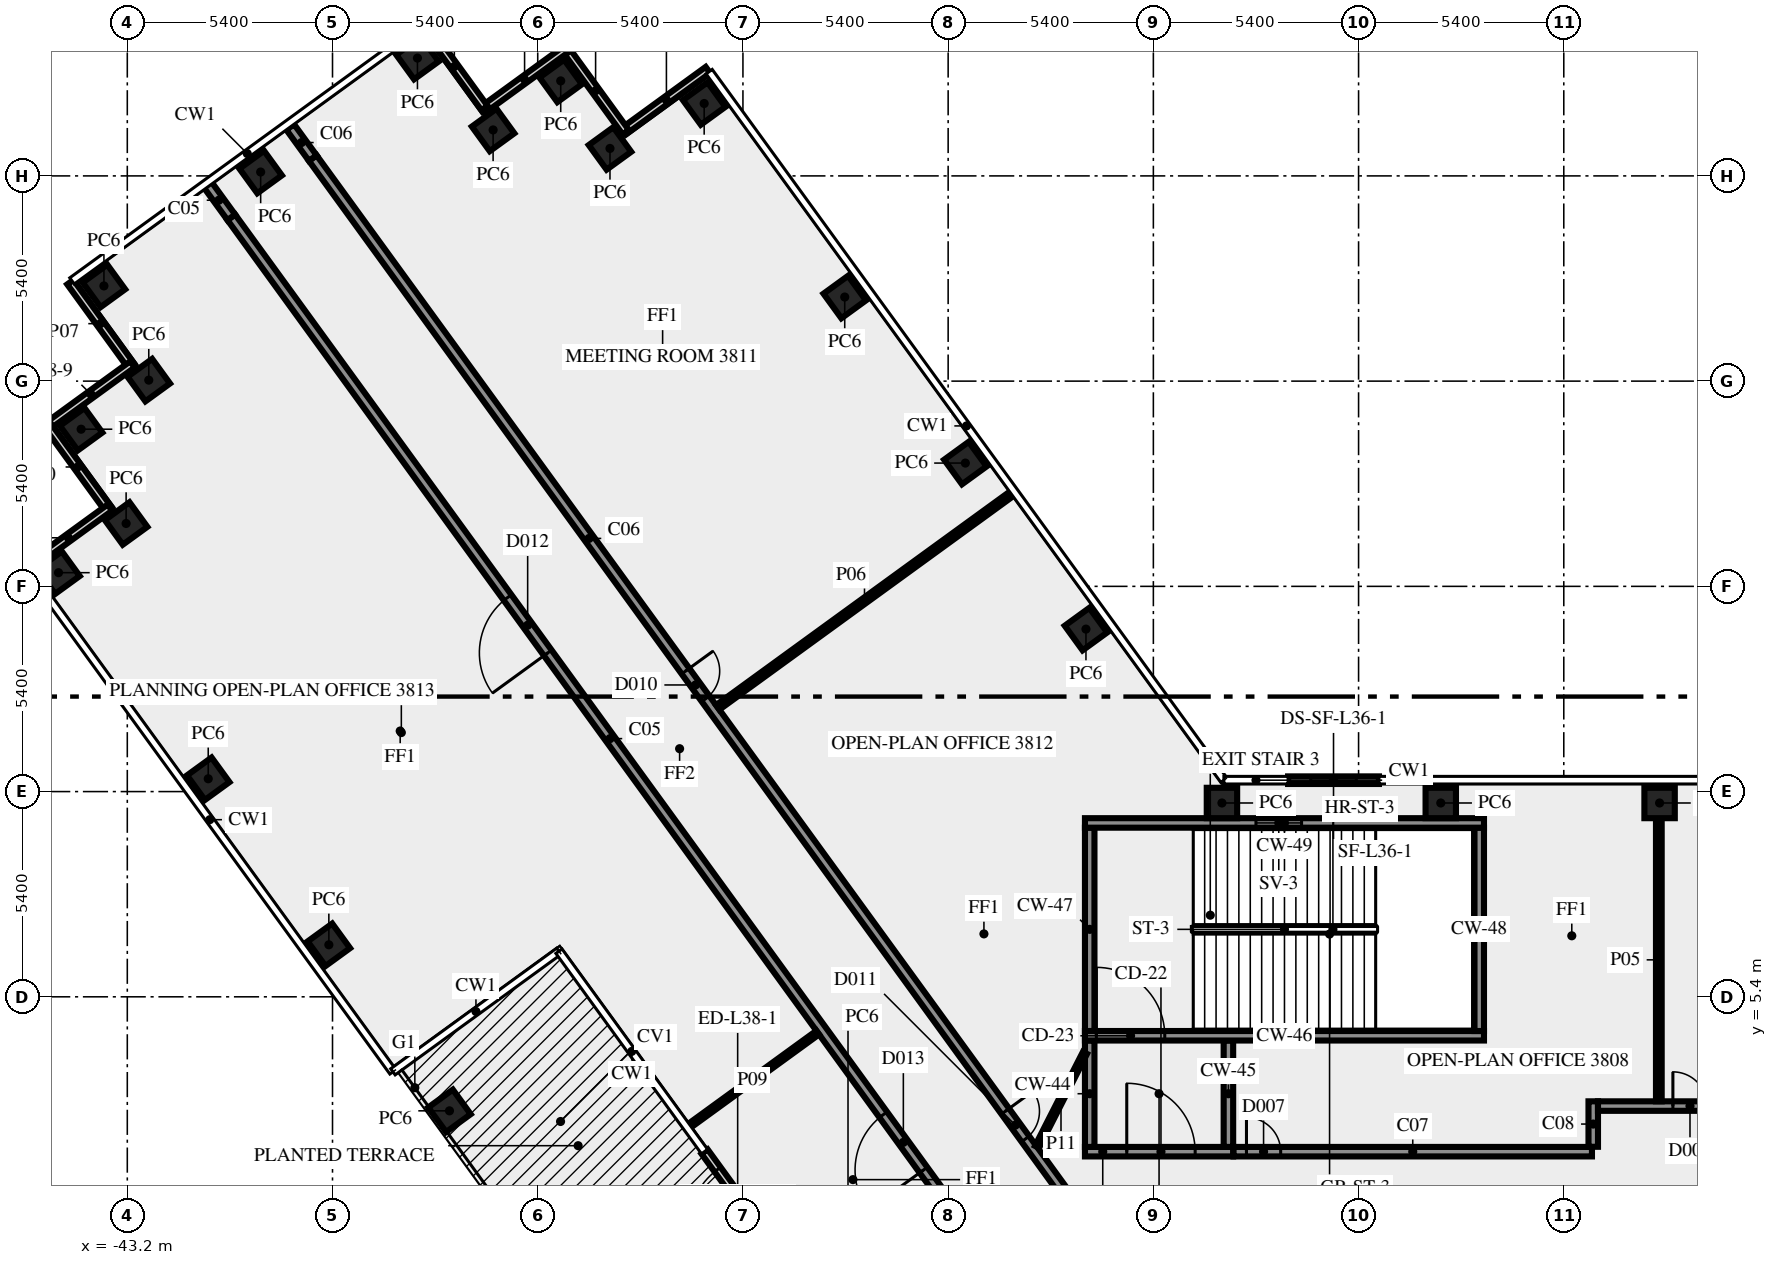
"""IFC4 building model, lengths in metres.
Left out: names, types, materials, properties, quantities, classifications, styles, units other than length and angle.
Written with IfcOpenShell. Run it as: python <this file> out.ifc"""

import sys

from ifc_helpers import new_model, si_unit, direction, frame, frame_2d, origin, origin_2d, place, context, subcontext, project, spatial, rectangle, extrude, element, fill, save


model = new_model("IFC4")
c1 = context("Model", 3, precision=1e-05, world=origin(), true_north=direction((0.0, 1.0)))
c2 = subcontext(c1, "Body", "Model", "MODEL_VIEW")
j1 = project(units=[si_unit("LENGTHUNIT", "METRE"), si_unit("PLANEANGLEUNIT", "RADIAN")], contexts=[c1])
p1 = place(None, origin())
s1 = spatial("IfcSite", under=j1, at=p1, CompositionType="ELEMENT")
p2 = place(p1, origin())
s2 = spatial("IfcBuilding", under=s1, at=p2, CompositionType="ELEMENT")
p3 = place(p2, frame((0.0, 0.0, 164.0)))
s3 = spatial("IfcBuildingStorey", under=s2, at=p3, CompositionType="ELEMENT", Elevation=164.0)
for number, where, z_axis, x_axis in (
    (1, (-17.974, 15.075, 0.0), (0.0, 0.0, 1.0), (-0.588, 0.809, 0.0)),
    (2, (-21.147, 19.444, 0.0), (0.0, 0.0, 1.0), (-0.588, 0.809, 0.0)),
    (3, (-24.321, 23.812, 0.0), (0.0, 0.0, 1.0), (-0.588, 0.809, 0.0)),
    (4, (-28.02, 28.905, 0.0), (0.0, 0.0, 1.0), (-0.809, -0.588, 0.0)),
    (5, (-30.499, 27.723, 0.0), (0.0, 0.0, 1.0), (-0.809, -0.588, 0.0)),
    (6, (-31.795, 29.5, 0.0), (0.0, 0.0, 1.0), (-0.588, 0.809, 0.0)),
    (7, (-33.574, 28.209, 0.0), (0.0, 0.0, 1.0), (-0.588, 0.809, 0.0)),
    (8, (-35.565, 30.1, 0.0), (0.0, 0.0, 1.0), (-0.809, -0.588, 0.0)),
    (9, (-39.691, 27.102, 0.0), (0.0, 0.0, 1.0), (-0.809, -0.588, 0.0)),
    (10, (-43.815, 24.105, 0.0), (0.0, 0.0, 1.0), (-0.809, -0.588, 0.0)),
    (11, (-42.635, 21.626, 0.0), (0.0, 0.0, 1.0), (-0.809, -0.588, 0.0)),
    (12, (-44.415, 20.335, 0.0), (0.0, 0.0, 1.0), (0.588, -0.809, 0.0)),
    (13, (-43.231, 17.854, 0.0), (0.0, 0.0, 1.0), (0.588, -0.809, 0.0)),
    (14, (-45.01, 16.56, 0.0), (0.0, 0.0, 1.0), (0.588, -0.809, 0.0)),
    (15, (-41.07, 11.137, 0.0), (0.0, 0.0, 1.0), (0.588, -0.809, 0.0)),
    (16, (-37.896, 6.769, 0.0), (0.0, 0.0, 1.0), (0.588, -0.809, 0.0)),
    (17, (-34.722, 2.4, 0.0), (0.0, 0.0, 1.0), (0.588, -0.809, 0.0)),
    (18, (-2.879, 10.5, 0.0), (0.0, 0.0, 1.0), (-1.0, 0.0, 0.0)),
    (19, (-8.637, 10.5, 0.0), (0.0, 0.0, 1.0), (-1.0, 0.0, 0.0)),
    (20, (-14.395, 10.5, 0.0), (0.0, 0.0, 1.0), (-1.0, 0.0, 0.0)),
):
    element("IfcColumn", number, at=place(p3, frame(where, z_axis=z_axis, x_axis=x_axis)), inside=s3, PredefinedType="COLUMN", context=c2, shape_type="SweptSolid", body=[
        extrude(rectangle(XDim=0.8, YDim=0.8, at=origin_2d()), origin(), (0.0, 0.0, 1.0), 3.65),
    ])
for number, where, z_axis, x_axis in (
    (21, (-27.921, 29.787, 0.0), (0.0, 0.0, 1.0), (-0.809, -0.588, 0.0)),
    (22, (-30.083, 28.149, 0.0), (0.0, 0.0, 1.0), (-0.588, 0.809, 0.0)),
    (23, (-31.654, 30.331, 0.0), (0.0, 0.0, 1.0), (-0.809, -0.588, 0.0)),
    (24, (-33.801, 28.786, 0.0), (0.0, 0.0, 1.0), (-0.588, 0.809, 0.0)),
    (25, (-44.699, 24.205, 0.0), (0.0, 0.0, 1.0), (0.588, -0.809, 0.0)),
):
    element("IfcWall", number, at=place(p3, frame(where, z_axis=z_axis, x_axis=x_axis)), inside=s3, PredefinedType="SOLIDWALL", context=c2, shape_type="SweptSolid", body=[
        extrude(rectangle(XDim=2.7, YDim=0.2, at=frame_2d((1.35, 0.0))), origin(), (0.0, 0.0, 1.0), 3.65),
    ])
p4 = place(p3, frame((-10.263, 11.1, 0.0), z_axis=(0.0, 0.0, 1.0), x_axis=(-1.0, 0.0, 0.0)))
e26 = element("IfcWall", 26, at=p4, inside=s3, PredefinedType="SOLIDWALL", context=c2, shape_type="SweptSolid", body=[
    extrude(rectangle(XDim=2.392, YDim=0.2, at=frame_2d((1.196, 0.0))), origin(), (0.0, 0.0, 1.0), 3.65),
])
p5 = place(p4, frame((0.596, 0.0, 1.0)))
e27 = element("IfcOpeningElement", 27, at=p5, cuts=e26, PredefinedType="OPENING", context=c2, shape_type="SweptSolid", body=[
    extrude(rectangle(XDim=1.2, YDim=1.2, at=frame_2d((0.6, 0.6))), frame((0.0, 0.11, 0.0), z_axis=(0.0, -1.0, 0.0), x_axis=(1.0, 0.0, 0.0)), (0.0, 0.0, 1.0), 0.22),
])
p6 = place(p3, frame((-26.268, -1.07, 0.0), z_axis=(0.0, 0.0, 1.0), x_axis=(-0.587735577821, 0.809053082661, 0.0)))
e28 = element("IfcWall", 28, at=p6, inside=s3, PredefinedType="SOLIDWALL", context=c2, shape_type="SweptSolid", body=[
    extrude(rectangle(XDim=2.963, YDim=0.2, at=frame_2d((1.481, 0.0))), origin(), (0.0, 0.0, 1.0), 3.65),
])
p7 = place(p6, frame((0.582, 0.0, 0.0)))
e29 = element("IfcOpeningElement", 29, at=p7, cuts=e28, PredefinedType="OPENING", context=c2, shape_type="SweptSolid", body=[
    extrude(rectangle(XDim=1.8, YDim=2.4, at=frame_2d((0.9, 1.2))), frame((0.0, 0.11, 0.0), z_axis=(0.0, -1.0, 0.0), x_axis=(1.0, 0.0, 0.0)), (0.0, 0.0, 1.0), 0.22),
])
for number, where, z_axis, x_axis in (
    (30, (-43.061, 22.043, 0.0), (0.0, 0.0, 1.0), (-0.809, -0.588, 0.0)),
    (31, (-45.296, 20.434, 0.0), (0.0, 0.0, 1.0), (0.588, -0.809, 0.0)),
    (32, (-43.658, 18.272, 0.0), (0.0, 0.0, 1.0), (-0.809, -0.588, 0.0)),
):
    element("IfcWall", number, at=place(p3, frame(where, z_axis=z_axis, x_axis=x_axis)), inside=s3, PredefinedType="SOLIDWALL", context=c2, shape_type="SweptSolid", body=[
        extrude(rectangle(XDim=2.7, YDim=0.2, at=frame_2d((1.35, 0.0))), origin(), (0.0, 0.0, 1.0), 3.65),
    ])
p8 = place(p3, frame((-18.0, 1.325, 0.0), z_axis=(0.0, 0.0, 1.0), x_axis=(1.0, 0.0, 0.0)))
e33 = element("IfcWall", 33, at=p8, inside=s3, PredefinedType="SHEAR", context=c2, shape_type="SweptSolid", body=[
    extrude(rectangle(XDim=3.9, YDim=0.25, at=frame_2d((1.95, 0.0))), origin(), (0.0, 0.0, 1.0), 3.65),
])
p9 = place(p8, frame((1.1, 0.0, 0.0)))
e34 = element("IfcOpeningElement", 34, at=p9, cuts=e33, PredefinedType="OPENING", context=c2, shape_type="SweptSolid", body=[
    extrude(rectangle(XDim=1.8, YDim=2.1, at=frame_2d((0.9, 1.05))), frame((0.0, 0.135, 0.0), z_axis=(0.0, -1.0, 0.0), x_axis=(1.0, 0.0, 0.0)), (0.0, 0.0, 1.0), 0.27),
])
for number, where, z_axis, x_axis in (
    (35, (-17.875, 1.45, 0.0), (0.0, 0.0, 1.0), (0.0, 1.0, 0.0)),
    (36, (-14.225, 1.45, 0.0), (0.0, 0.0, 1.0), (0.0, 1.0, 0.0)),
):
    element("IfcWall", number, at=place(p3, frame(where, z_axis=z_axis, x_axis=x_axis)), inside=s3, PredefinedType="SHEAR", context=c2, shape_type="SweptSolid", body=[
        extrude(rectangle(XDim=2.8, YDim=0.25, at=frame_2d((1.4, 0.0))), origin(), (0.0, 0.0, 1.0), 3.65),
    ])
p10 = place(p3, frame((-18.0, 4.375, 0.0), z_axis=(0.0, 0.0, 1.0), x_axis=(1.0, 0.0, 0.0)))
e37 = element("IfcWall", 37, at=p10, inside=s3, PredefinedType="SHEAR", context=c2, shape_type="SweptSolid", body=[
    extrude(rectangle(XDim=10.5, YDim=0.25, at=frame_2d((5.25, 0.0))), origin(), (0.0, 0.0, 1.0), 3.65),
])
p11 = place(p10, frame((0.3, 0.0, 0.0)))
e38 = element("IfcOpeningElement", 38, at=p11, cuts=e37, PredefinedType="OPENING", context=c2, shape_type="SweptSolid", body=[
    extrude(rectangle(XDim=1.8, YDim=2.1, at=frame_2d((0.9, 1.05))), frame((0.0, 0.135, 0.0), z_axis=(0.0, -1.0, 0.0), x_axis=(1.0, 0.0, 0.0)), (0.0, 0.0, 1.0), 0.27),
])
for number, where, z_axis, x_axis in (
    (39, (-17.875, 4.5, 0.0), (0.0, 0.0, 1.0), (0.0, 1.0, 0.0)),
    (40, (-7.625, 4.5, 0.0), (0.0, 0.0, 1.0), (0.0, 1.0, 0.0)),
):
    element("IfcWall", number, at=place(p3, frame(where, z_axis=z_axis, x_axis=x_axis)), inside=s3, PredefinedType="SHEAR", context=c2, shape_type="SweptSolid", body=[
        extrude(rectangle(XDim=5.35, YDim=0.25, at=frame_2d((2.675, 0.0))), origin(), (0.0, 0.0, 1.0), 3.65),
    ])
p12 = place(p3, frame((-18.0, 9.975, 0.0), z_axis=(0.0, 0.0, 1.0), x_axis=(1.0, 0.0, 0.0)))
e41 = element("IfcWall", 41, at=p12, inside=s3, PredefinedType="SHEAR", context=c2, shape_type="SweptSolid", body=[
    extrude(rectangle(XDim=10.5, YDim=0.25, at=frame_2d((5.25, 0.0))), origin(), (0.0, 0.0, 1.0), 3.65),
])
p13 = place(p12, frame((4.5, 0.0, 1.0)))
e42 = element("IfcOpeningElement", 42, at=p13, cuts=e41, PredefinedType="OPENING", context=c2, shape_type="SweptSolid", body=[
    extrude(rectangle(XDim=1.2, YDim=1.2, at=frame_2d((0.6, 0.6))), frame((0.0, 0.135, 0.0), z_axis=(0.0, -1.0, 0.0), x_axis=(1.0, 0.0, 0.0)), (0.0, 0.0, 1.0), 0.27),
])
p14 = place(p3, frame((-20.531, -1.523, 0.0), z_axis=(0.0, 0.0, 1.0), x_axis=(-0.587781654618, 0.809019608226, 0.0)))
e43 = element("IfcWall", 43, at=p14, inside=s3, PredefinedType="SOLIDWALL", context=c2, shape_type="SweptSolid", body=[
    extrude(rectangle(XDim=33.911, YDim=0.25, at=frame_2d((16.956, 0.0))), origin(), (0.0, 0.0, 1.0), 3.65),
])
p15 = place(p14, frame((19.743, 0.0, 0.0)))
e44 = element("IfcOpeningElement", 44, at=p15, cuts=e43, PredefinedType="OPENING", context=c2, shape_type="SweptSolid", body=[
    extrude(rectangle(XDim=1.8, YDim=2.1, at=frame_2d((0.9, 1.05))), frame((0.0, 0.135, 0.0), z_axis=(0.0, -1.0, 0.0), x_axis=(1.0, 0.0, 0.0)), (0.0, 0.0, 1.0), 0.27),
])
p16 = place(p14, frame((2.924, 0.0, 0.0)))
e45 = element("IfcOpeningElement", 45, at=p16, cuts=e43, PredefinedType="OPENING", context=c2, shape_type="SweptSolid", body=[
    extrude(rectangle(XDim=1.8, YDim=2.1, at=frame_2d((0.9, 1.05))), frame((0.0, 0.135, 0.0), z_axis=(0.0, -1.0, 0.0), x_axis=(1.0, 0.0, 0.0)), (0.0, 0.0, 1.0), 0.27),
])
p17 = place(p3, frame((-38.32, 27.469, 0.0), z_axis=(0.0, 0.0, 1.0), x_axis=(0.587788021768, -0.809014982226, 0.0)))
e46 = element("IfcWall", 46, at=p17, inside=s3, PredefinedType="SOLIDWALL", context=c2, shape_type="SweptSolid", body=[
    extrude(rectangle(XDim=35.344, YDim=0.25, at=frame_2d((17.672, 0.0))), origin(), (0.0, 0.0, 1.0), 3.65),
])
p18 = place(p17, frame((31.003, 0.0, 0.0)))
e47 = element("IfcOpeningElement", 47, at=p18, cuts=e46, PredefinedType="OPENING", context=c2, shape_type="SweptSolid", body=[
    extrude(rectangle(XDim=0.9, YDim=2.1, at=frame_2d((0.45, 1.05))), frame((0.0, 0.135, 0.0), z_axis=(0.0, -1.0, 0.0), x_axis=(1.0, 0.0, 0.0)), (0.0, 0.0, 1.0), 0.27),
])
p19 = place(p17, frame((16.687, 0.0, 0.0)))
e48 = element("IfcOpeningElement", 48, at=p19, cuts=e46, PredefinedType="OPENING", context=c2, shape_type="SweptSolid", body=[
    extrude(rectangle(XDim=0.9, YDim=2.1, at=frame_2d((0.45, 1.05))), frame((0.0, 0.135, 0.0), z_axis=(0.0, -1.0, 0.0), x_axis=(1.0, 0.0, 0.0)), (0.0, 0.0, 1.0), 0.27),
])
p20 = place(p3, frame((-14.09, 1.325, 0.0), z_axis=(0.0, 0.0, 1.0), x_axis=(1.0, 0.0, 0.0)))
e49 = element("IfcWall", 49, at=p20, inside=s3, PredefinedType="SOLIDWALL", context=c2, shape_type="SweptSolid", body=[
    extrude(rectangle(XDim=9.431, YDim=0.25, at=frame_2d((4.716, 0.0))), origin(), (0.0, 0.0, 1.0), 3.65),
])
p21 = place(p20, frame((0.34, 0.0, 0.0)))
e50 = element("IfcOpeningElement", 50, at=p21, cuts=e49, PredefinedType="OPENING", context=c2, shape_type="SweptSolid", body=[
    extrude(rectangle(XDim=0.9, YDim=2.1, at=frame_2d((0.45, 1.05))), frame((0.0, 0.135, 0.0), z_axis=(0.0, -1.0, 0.0), x_axis=(1.0, 0.0, 0.0)), (0.0, 0.0, 1.0), 0.27),
])
p22 = place(p3, frame((-4.625, 1.454, 0.0), z_axis=(0.0, 0.0, 1.0), x_axis=(0.0, 1.0, 0.0)))
e51 = element("IfcWall", 51, at=p22, inside=s3, PredefinedType="SOLIDWALL", context=c2, shape_type="SweptSolid", body=[
    extrude(rectangle(XDim=1.196, YDim=0.25, at=frame_2d((0.598, 0.0))), origin(), (0.0, 0.0, 1.0), 3.65),
])
p23 = place(p3, frame((-4.5, 2.525, 0.0), z_axis=(0.0, 0.0, 1.0), x_axis=(1.0, 0.0, 0.0)))
e52 = element("IfcWall", 52, at=p23, inside=s3, PredefinedType="SOLIDWALL", context=c2, shape_type="SweptSolid", body=[
    extrude(rectangle(XDim=11.25, YDim=0.25, at=frame_2d((5.625, 0.0))), origin(), (0.0, 0.0, 1.0), 3.65),
])
p24 = place(p23, frame((1.971, 0.0, 0.0)))
e53 = element("IfcOpeningElement", 53, at=p24, cuts=e52, PredefinedType="OPENING", context=c2, shape_type="SweptSolid", body=[
    extrude(rectangle(XDim=0.9, YDim=2.1, at=frame_2d((0.45, 1.05))), frame((0.0, 0.135, 0.0), z_axis=(0.0, -1.0, 0.0), x_axis=(1.0, 0.0, 0.0)), (0.0, 0.0, 1.0), 0.27),
])
p25 = place(p3, frame((-2.899, 2.65, 0.0), z_axis=(0.0, 0.0, 1.0), x_axis=(0.0, 1.0, 0.0)))
e54 = element("IfcWall", 54, at=p25, inside=s3, PredefinedType="PARTITIONING", context=c2, shape_type="SweptSolid", body=[
    extrude(rectangle(XDim=7.445, YDim=0.15, at=frame_2d((3.723, 0.0))), origin(), (0.0, 0.0, 1.0), 3.65),
])
p26 = place(p3, frame((-19.938, 18.629, 0.0), z_axis=(0.0, 0.0, 1.0), x_axis=(-0.80900684162, -0.587799226107, 0.0)))
e55 = element("IfcWall", 55, at=p26, inside=s3, PredefinedType="PARTITIONING", context=c2, shape_type="SweptSolid", body=[
    extrude(rectangle(XDim=9.55, YDim=0.15, at=frame_2d((4.775, 0.0))), origin(), (0.0, 0.0, 1.0), 2.85),
])
p27 = place(p3, frame((-28.471, 1.96, 0.0), z_axis=(0.0, 0.0, 1.0), x_axis=(0.809031498435, 0.587765288649, 0.0)))
e56 = element("IfcWall", 56, at=p27, inside=s3, PredefinedType="PARTITIONING", context=c2, shape_type="SweptSolid", body=[
    extrude(rectangle(XDim=4.251, YDim=0.12, at=frame_2d((2.125, 0.0))), origin(), (0.0, 0.0, 1.0), 3.65),
])
p28 = place(p3, frame((-19.261, 1.45, 0.0), z_axis=(0.0, 0.0, 1.0), x_axis=(0.453950796792, 0.891026752736, 0.0)))
e57 = element("IfcWall", 57, at=p28, inside=s3, PredefinedType="PARTITIONING", context=c2, shape_type="SweptSolid", body=[
    extrude(rectangle(XDim=2.778, YDim=0.12, at=frame_2d((1.389, 0.0))), origin(), (0.0, 0.0, 1.0), 3.65),
])
p29 = place(p3, frame((-40.463, 25.911, 0.0), z_axis=(0.0, 0.0, 1.0), x_axis=(-0.587792454268, 0.809011761785, 0.0)))
e58 = element("IfcWall", 58, at=p29, inside=s3, PredefinedType="SOLIDWALL", context=c2, shape_type="SweptSolid", body=[
    extrude(rectangle(XDim=1.11, YDim=0.25, at=frame_2d((0.555, 0.0))), origin(), (0.0, 0.0, 1.0), 2.85),
])
p30 = place(p3, frame((-38.32, 27.469, 0.0), z_axis=(0.0, 0.0, 1.0), x_axis=(-0.587811913486, 0.808997623213, 0.0)))
e59 = element("IfcWall", 59, at=p30, inside=s3, PredefinedType="SOLIDWALL", context=c2, shape_type="SweptSolid", body=[
    extrude(rectangle(XDim=1.009, YDim=0.25, at=frame_2d((0.504, 0.0))), origin(), (0.0, 0.0, 1.0), 2.85),
])
p31 = place(p5, origin())
e60 = element("IfcWindow", 60, at=p31, inside=s3, PartitioningType="SINGLE_PANEL", PredefinedType="WINDOW", context=c2, shape_type="SweptSolid", body=[
    extrude(rectangle(XDim=1.2, YDim=1.2, at=frame_2d((0.6, 0.6))), frame((0.0, 0.03, 0.0), z_axis=(0.0, -1.0, 0.0), x_axis=(1.0, 0.0, 0.0)), (0.0, 0.0, 1.0), 0.06),
])
fill(e27, e60)
p32 = place(p7, origin())
e61 = element("IfcDoor", 61, at=p32, inside=s3, OperationType="DOUBLE_DOOR_SINGLE_SWING", PredefinedType="DOOR", context=c2, shape_type="SweptSolid", body=[
    extrude(rectangle(XDim=1.8, YDim=2.4, at=frame_2d((0.9, 1.2))), frame((0.0, 0.025, 0.0), z_axis=(0.0, -1.0, 0.0), x_axis=(1.0, 0.0, 0.0)), (0.0, 0.0, 1.0), 0.05),
])
fill(e29, e61)
p33 = place(p9, origin())
e62 = element("IfcDoor", 62, at=p33, inside=s3, OperationType="DOUBLE_DOOR_SINGLE_SWING", PredefinedType="DOOR", context=c2, shape_type="SweptSolid", body=[
    extrude(rectangle(XDim=1.8, YDim=2.1, at=frame_2d((0.9, 1.05))), frame((0.0, 0.025, 0.0), z_axis=(0.0, -1.0, 0.0), x_axis=(1.0, 0.0, 0.0)), (0.0, 0.0, 1.0), 0.05),
])
fill(e34, e62)
p34 = place(p11, origin())
e63 = element("IfcDoor", 63, at=p34, inside=s3, OperationType="DOUBLE_DOOR_SINGLE_SWING", PredefinedType="DOOR", context=c2, shape_type="SweptSolid", body=[
    extrude(rectangle(XDim=1.8, YDim=2.1, at=frame_2d((0.9, 1.05))), frame((0.0, 0.025, 0.0), z_axis=(0.0, -1.0, 0.0), x_axis=(1.0, 0.0, 0.0)), (0.0, 0.0, 1.0), 0.05),
])
fill(e38, e63)
p35 = place(p13, origin())
e64 = element("IfcWindow", 64, at=p35, inside=s3, PartitioningType="SINGLE_PANEL", PredefinedType="WINDOW", context=c2, shape_type="SweptSolid", body=[
    extrude(rectangle(XDim=1.2, YDim=1.2, at=frame_2d((0.6, 0.6))), frame((0.0, 0.03, 0.0), z_axis=(0.0, -1.0, 0.0), x_axis=(1.0, 0.0, 0.0)), (0.0, 0.0, 1.0), 0.06),
])
fill(e42, e64)
p36 = place(p21, origin())
e65 = element("IfcDoor", 65, at=p36, inside=s3, OperationType="SINGLE_SWING_LEFT", PredefinedType="DOOR", context=c2, shape_type="SweptSolid", body=[
    extrude(rectangle(XDim=0.9, YDim=2.1, at=frame_2d((0.45, 1.05))), frame((0.0, 0.025, 0.0), z_axis=(0.0, -1.0, 0.0), x_axis=(1.0, 0.0, 0.0)), (0.0, 0.0, 1.0), 0.05),
])
fill(e50, e65)
p37 = place(p18, origin())
e66 = element("IfcDoor", 66, at=p37, inside=s3, OperationType="SINGLE_SWING_RIGHT", PredefinedType="DOOR", context=c2, shape_type="SweptSolid", body=[
    extrude(rectangle(XDim=0.9, YDim=2.1, at=frame_2d((0.45, 1.05))), frame((0.0, 0.025, 0.0), z_axis=(0.0, -1.0, 0.0), x_axis=(1.0, 0.0, 0.0)), (0.0, 0.0, 1.0), 0.05),
])
fill(e47, e66)
p38 = place(p24, origin())
e67 = element("IfcDoor", 67, at=p38, inside=s3, OperationType="SINGLE_SWING_LEFT", PredefinedType="DOOR", context=c2, shape_type="SweptSolid", body=[
    extrude(rectangle(XDim=0.9, YDim=2.1, at=frame_2d((0.45, 1.05))), frame((0.0, 0.025, 0.0), z_axis=(0.0, -1.0, 0.0), x_axis=(1.0, 0.0, 0.0)), (0.0, 0.0, 1.0), 0.05),
])
fill(e53, e67)
p39 = place(p19, origin())
e68 = element("IfcDoor", 68, at=p39, inside=s3, OperationType="SINGLE_SWING_RIGHT", PredefinedType="DOOR", context=c2, shape_type="SweptSolid", body=[
    extrude(rectangle(XDim=0.9, YDim=2.1, at=frame_2d((0.45, 1.05))), frame((0.0, 0.025, 0.0), z_axis=(0.0, -1.0, 0.0), x_axis=(1.0, 0.0, 0.0)), (0.0, 0.0, 1.0), 0.05),
])
fill(e48, e68)
p40 = place(p15, origin())
e69 = element("IfcDoor", 69, at=p40, inside=s3, OperationType="DOUBLE_DOOR_SINGLE_SWING", PredefinedType="DOOR", context=c2, shape_type="SweptSolid", body=[
    extrude(rectangle(XDim=1.8, YDim=2.1, at=frame_2d((0.9, 1.05))), frame((0.0, 0.025, 0.0), z_axis=(0.0, -1.0, 0.0), x_axis=(1.0, 0.0, 0.0)), (0.0, 0.0, 1.0), 0.05),
])
fill(e44, e69)
p41 = place(p16, origin())
e70 = element("IfcDoor", 70, at=p41, inside=s3, OperationType="DOUBLE_DOOR_SINGLE_SWING", PredefinedType="DOOR", context=c2, shape_type="SweptSolid", body=[
    extrude(rectangle(XDim=1.8, YDim=2.1, at=frame_2d((0.9, 1.05))), frame((0.0, 0.025, 0.0), z_axis=(0.0, -1.0, 0.0), x_axis=(1.0, 0.0, 0.0)), (0.0, 0.0, 1.0), 0.05),
])
fill(e45, e70)
save(model, sys.argv[1])
